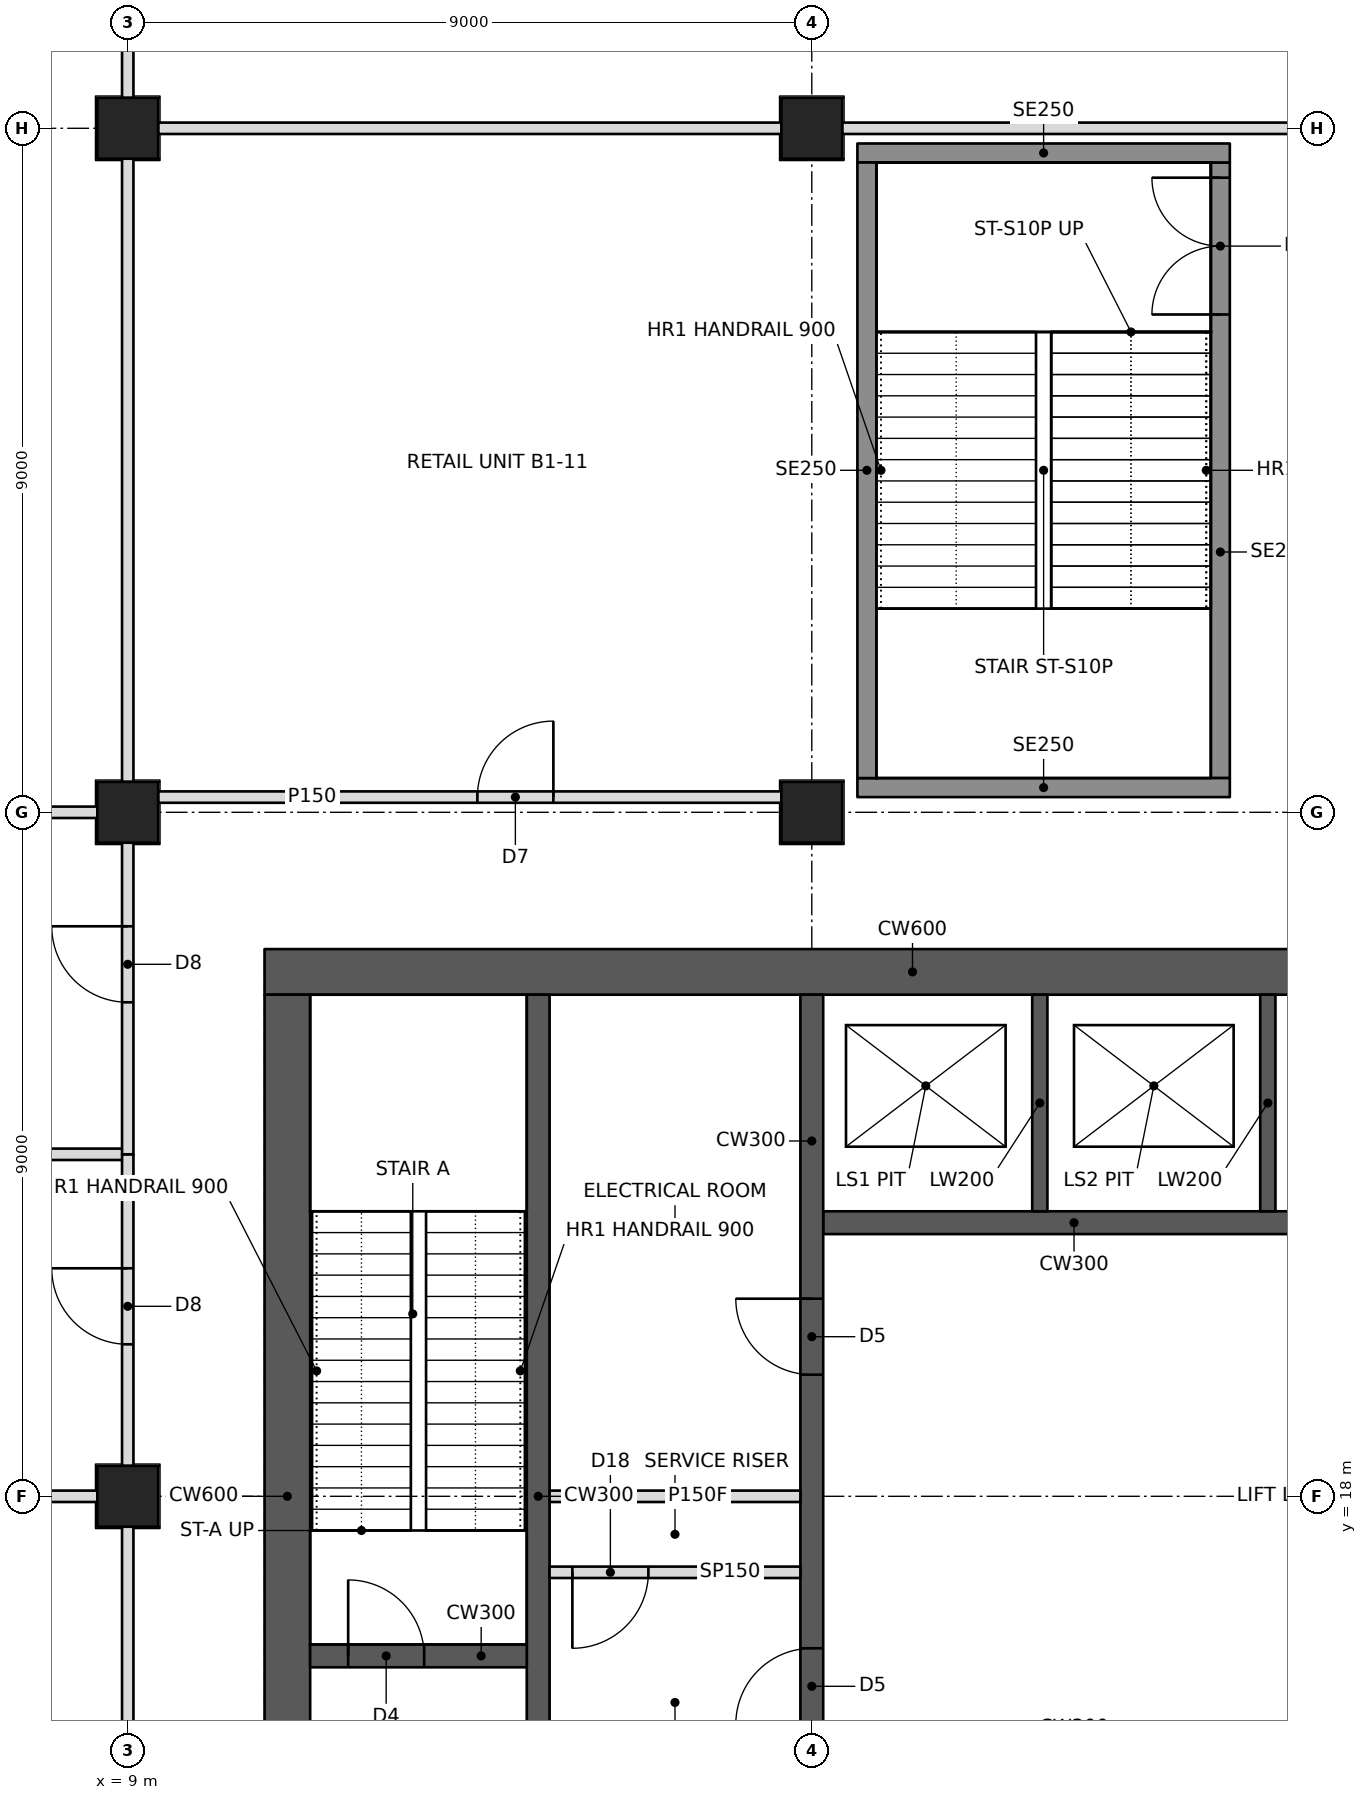
"""IFC4 building model, lengths in metres.
Left out: names, types, materials, properties, quantities, classifications, styles, units other than length and angle.
Written with IfcOpenShell. Run it as: python <this file> out.ifc"""

import sys

from ifc_helpers import new_model, si_unit, direction, frame, frame_2d, origin, origin_2d, place, context, subcontext, project, spatial, rectangle, hollow_rectangle, extrude, element, fill, save


model = new_model("IFC4")
c1 = context("Model", 3, precision=1e-05, world=origin(), true_north=direction((0.0, 1.0)))
c2 = subcontext(c1, "Body", "Model", "MODEL_VIEW")
j1 = project(units=[si_unit("LENGTHUNIT", "METRE"), si_unit("PLANEANGLEUNIT", "RADIAN")], contexts=[c1])
p1 = place(None, origin())
s1 = spatial("IfcSite", under=j1, at=p1, CompositionType="ELEMENT")
p2 = place(p1, origin())
s2 = spatial("IfcBuilding", under=s1, at=p2, CompositionType="ELEMENT")
p3 = place(p2, frame((0.0, 0.0, -5.5)))
s3 = spatial("IfcBuildingStorey", under=s2, at=p3, CompositionType="ELEMENT", Elevation=-5.5)
for number, where, z_axis, x_axis in (
    (1, (9.0, 18.0, 0.0), (0.0, 0.0, 1.0), (1.0, 0.0, 0.0)),
    (2, (9.0, 27.0, 0.0), (0.0, 0.0, 1.0), (1.0, 0.0, 0.0)),
    (3, (9.0, 36.0, 0.0), (0.0, 0.0, 1.0), (1.0, 0.0, 0.0)),
    (4, (18.0, 27.0, 0.0), (0.0, 0.0, 1.0), (1.0, 0.0, 0.0)),
    (5, (18.0, 36.0, 0.0), (0.0, 0.0, 1.0), (1.0, 0.0, 0.0)),
):
    element("IfcColumn", number, at=place(p3, frame(where, z_axis=z_axis, x_axis=x_axis)), inside=s3, PredefinedType="COLUMN", context=c2, shape_type="SweptSolid", body=[
        extrude(hollow_rectangle(XDim=0.8, YDim=0.8, WallThickness=0.1, at=origin_2d()), origin(), (0.0, 0.0, 1.0), 5.5),
    ])
p4 = place(p3, frame((10.8, 24.9, 0.0), z_axis=(0.0, 0.0, 1.0), x_axis=(1.0, 0.0, 0.0)))
e6 = element("IfcWall", 6, at=p4, inside=s3, PredefinedType="SHEAR", context=c2, shape_type="SweptSolid", body=[
    extrude(rectangle(XDim=23.4, YDim=0.6, at=frame_2d((11.7, 0.0))), origin(), (0.0, 0.0, 1.0), 5.5),
])
p5 = place(p4, frame((17.2, 0.0, 0.0)))
e7 = element("IfcOpeningElement", 7, at=p5, cuts=e6, PredefinedType="OPENING", context=c2, shape_type="SweptSolid", body=[
    extrude(rectangle(XDim=1.8, YDim=2.1, at=frame_2d((0.9, 1.05))), frame((0.0, 0.31, 0.0), z_axis=(0.0, -1.0, 0.0), x_axis=(1.0, 0.0, 0.0)), (0.0, 0.0, 1.0), 0.62),
])
p6 = place(p4, frame((21.1, 0.0, 0.0)))
e8 = element("IfcOpeningElement", 8, at=p6, cuts=e6, PredefinedType="OPENING", context=c2, shape_type="SweptSolid", body=[
    extrude(rectangle(XDim=1.0, YDim=2.1, at=frame_2d((0.5, 1.05))), frame((0.0, 0.31, 0.0), z_axis=(0.0, -1.0, 0.0), x_axis=(1.0, 0.0, 0.0)), (0.0, 0.0, 1.0), 0.62),
])
p7 = place(p3, frame((11.1, 11.4, 0.0), z_axis=(0.0, 0.0, 1.0), x_axis=(0.0, 1.0, 0.0)))
e9 = element("IfcWall", 9, at=p7, inside=s3, PredefinedType="SHEAR", context=c2, shape_type="SweptSolid", body=[
    extrude(rectangle(XDim=13.2, YDim=0.6, at=frame_2d((6.6, 0.0))), origin(), (0.0, 0.0, 1.0), 5.5),
])
p8 = place(p3, frame((14.4, 11.4, 0.0), z_axis=(0.0, 0.0, 1.0), x_axis=(0.0, 1.0, 0.0)))
e10 = element("IfcWall", 10, at=p8, inside=s3, PredefinedType="SHEAR", context=c2, shape_type="SweptSolid", body=[
    extrude(rectangle(XDim=13.2, YDim=0.3, at=frame_2d((6.6, 0.0))), origin(), (0.0, 0.0, 1.0), 5.5),
])
p9 = place(p3, frame((11.4, 15.9, 0.0), z_axis=(0.0, 0.0, 1.0), x_axis=(1.0, 0.0, 0.0)))
e11 = element("IfcWall", 11, at=p9, inside=s3, PredefinedType="SHEAR", context=c2, shape_type="SweptSolid", body=[
    extrude(rectangle(XDim=2.85, YDim=0.3, at=frame_2d((1.425, 0.0))), origin(), (0.0, 0.0, 1.0), 5.5),
])
p10 = place(p9, frame((0.5, 0.0, 0.0)))
e12 = element("IfcOpeningElement", 12, at=p10, cuts=e11, PredefinedType="OPENING", context=c2, shape_type="SweptSolid", body=[
    extrude(rectangle(XDim=1.0, YDim=2.1, at=frame_2d((0.5, 1.05))), frame((0.0, 0.16, 0.0), z_axis=(0.0, -1.0, 0.0), x_axis=(1.0, 0.0, 0.0)), (0.0, 0.0, 1.0), 0.32),
])
p11 = place(p3, frame((18.0, 11.4, 0.0), z_axis=(0.0, 0.0, 1.0), x_axis=(0.0, 1.0, 0.0)))
e13 = element("IfcWall", 13, at=p11, inside=s3, PredefinedType="SHEAR", context=c2, shape_type="SweptSolid", body=[
    extrude(rectangle(XDim=13.2, YDim=0.3, at=frame_2d((6.6, 0.0))), origin(), (0.0, 0.0, 1.0), 5.5),
])
p12 = place(p11, frame((3.6, 0.0, 0.0)))
e14 = element("IfcOpeningElement", 14, at=p12, cuts=e13, PredefinedType="OPENING", context=c2, shape_type="SweptSolid", body=[
    extrude(rectangle(XDim=1.0, YDim=2.1, at=frame_2d((0.5, 1.05))), frame((0.0, 0.16, 0.0), z_axis=(0.0, -1.0, 0.0), x_axis=(1.0, 0.0, 0.0)), (0.0, 0.0, 1.0), 0.32),
])
p13 = place(p11, frame((8.2, 0.0, 0.0)))
e15 = element("IfcOpeningElement", 15, at=p13, cuts=e13, PredefinedType="OPENING", context=c2, shape_type="SweptSolid", body=[
    extrude(rectangle(XDim=1.0, YDim=2.1, at=frame_2d((0.5, 1.05))), frame((0.0, 0.16, 0.0), z_axis=(0.0, -1.0, 0.0), x_axis=(1.0, 0.0, 0.0)), (0.0, 0.0, 1.0), 0.32),
])
p14 = place(p3, frame((14.55, 18.0, 0.0), z_axis=(0.0, 0.0, 1.0), x_axis=(1.0, 0.0, 0.0)))
e16 = element("IfcWall", 16, at=p14, inside=s3, PredefinedType="PARTITIONING", context=c2, shape_type="SweptSolid", body=[
    extrude(rectangle(XDim=3.3, YDim=0.15, at=frame_2d((1.65, 0.0))), origin(), (0.0, 0.0, 1.0), 5.2),
])
p15 = place(p3, frame((18.15, 21.6, 0.0), z_axis=(0.0, 0.0, 1.0), x_axis=(1.0, 0.0, 0.0)))
e17 = element("IfcWall", 17, at=p15, inside=s3, PredefinedType="SHEAR", context=c2, shape_type="SweptSolid", body=[
    extrude(rectangle(XDim=9.0, YDim=0.3, at=frame_2d((4.5, 0.0))), origin(), (0.0, 0.0, 1.0), 5.5),
])
p16 = place(p15, frame((6.75, 0.0, 0.0)))
e18 = element("IfcOpeningElement", 18, at=p16, cuts=e17, PredefinedType="OPENING", context=c2, shape_type="SweptSolid", body=[
    extrude(rectangle(XDim=1.2, YDim=2.1, at=frame_2d((0.6, 1.05))), frame((0.0, 0.16, 0.0), z_axis=(0.0, -1.0, 0.0), x_axis=(1.0, 0.0, 0.0)), (0.0, 0.0, 1.0), 0.32),
])
for number, where, z_axis, x_axis in (
    (19, (21.0, 21.75, 0.0), (0.0, 0.0, 1.0), (0.0, 1.0, 0.0)),
    (20, (24.0, 21.75, 0.0), (0.0, 0.0, 1.0), (0.0, 1.0, 0.0)),
):
    element("IfcWall", number, at=place(p3, frame(where, z_axis=z_axis, x_axis=x_axis)), inside=s3, PredefinedType="SHEAR", context=c2, shape_type="SweptSolid", body=[
        extrude(rectangle(XDim=2.85, YDim=0.2, at=frame_2d((1.425, 0.0))), origin(), (0.0, 0.0, 1.0), 5.5),
    ])
p17 = place(p3, frame((0.4, 18.0, 0.0), z_axis=(0.0, 0.0, 1.0), x_axis=(1.0, 0.0, 0.0)))
e21 = element("IfcWall", 21, at=p17, inside=s3, PredefinedType="PARTITIONING", context=c2, shape_type="SweptSolid", body=[
    extrude(rectangle(XDim=8.2, YDim=0.15, at=frame_2d((4.1, 0.0))), origin(), (0.0, 0.0, 1.0), 4.253),
])
p18 = place(p3, frame((-9.3, 22.5, 0.0), z_axis=(0.0, 0.0, 1.0), x_axis=(1.0, 0.0, 0.0)))
e22 = element("IfcWall", 22, at=p18, inside=s3, PredefinedType="PARTITIONING", context=c2, shape_type="SweptSolid", body=[
    extrude(rectangle(XDim=18.3, YDim=0.15, at=frame_2d((9.15, 0.0))), origin(), (0.0, 0.0, 1.0), 4.252),
])
p19 = place(p3, frame((0.4, 27.0, 0.0), z_axis=(0.0, 0.0, 1.0), x_axis=(1.0, 0.0, 0.0)))
e23 = element("IfcWall", 23, at=p19, inside=s3, PredefinedType="PARTITIONING", context=c2, shape_type="SweptSolid", body=[
    extrude(rectangle(XDim=8.2, YDim=0.15, at=frame_2d((4.1, 0.0))), origin(), (0.0, 0.0, 1.0), 4.253),
])
p20 = place(p3, frame((9.0, 17.6, 0.0), z_axis=(0.0, 0.0, 1.0), x_axis=(0.0, -1.0, 0.0)))
e24 = element("IfcWall", 24, at=p20, inside=s3, PredefinedType="PARTITIONING", context=c2, shape_type="SweptSolid", body=[
    extrude(rectangle(XDim=8.2, YDim=0.15, at=frame_2d((4.1, 0.0))), origin(), (0.0, 0.0, 1.0), 4.253),
])
p21 = place(p20, frame((6.6, 0.0, 0.0)))
e25 = element("IfcOpeningElement", 25, at=p21, cuts=e24, PredefinedType="OPENING", context=c2, shape_type="SweptSolid", body=[
    extrude(rectangle(XDim=1.0, YDim=2.1, at=frame_2d((0.5, 1.05))), frame((0.0, 0.085, 0.0), z_axis=(0.0, -1.0, 0.0), x_axis=(1.0, 0.0, 0.0)), (0.0, 0.0, 1.0), 0.17),
])
p22 = place(p3, frame((9.0, 22.5, 0.0), z_axis=(0.0, 0.0, 1.0), x_axis=(0.0, -1.0, 0.0)))
e26 = element("IfcWall", 26, at=p22, inside=s3, PredefinedType="PARTITIONING", context=c2, shape_type="SweptSolid", body=[
    extrude(rectangle(XDim=4.1, YDim=0.15, at=frame_2d((2.05, 0.0))), origin(), (0.0, 0.0, 1.0), 4.253),
])
p23 = place(p22, frame((1.5, 0.0, 0.0)))
e27 = element("IfcOpeningElement", 27, at=p23, cuts=e26, PredefinedType="OPENING", context=c2, shape_type="SweptSolid", body=[
    extrude(rectangle(XDim=1.0, YDim=2.1, at=frame_2d((0.5, 1.05))), frame((0.0, 0.085, 0.0), z_axis=(0.0, -1.0, 0.0), x_axis=(1.0, 0.0, 0.0)), (0.0, 0.0, 1.0), 0.17),
])
p24 = place(p3, frame((9.0, 26.6, 0.0), z_axis=(0.0, 0.0, 1.0), x_axis=(0.0, -1.0, 0.0)))
e28 = element("IfcWall", 28, at=p24, inside=s3, PredefinedType="PARTITIONING", context=c2, shape_type="SweptSolid", body=[
    extrude(rectangle(XDim=4.1, YDim=0.15, at=frame_2d((2.05, 0.0))), origin(), (0.0, 0.0, 1.0), 4.253),
])
p25 = place(p24, frame((1.1, 0.0, 0.0)))
e29 = element("IfcOpeningElement", 29, at=p25, cuts=e28, PredefinedType="OPENING", context=c2, shape_type="SweptSolid", body=[
    extrude(rectangle(XDim=1.0, YDim=2.1, at=frame_2d((0.5, 1.05))), frame((0.0, 0.085, 0.0), z_axis=(0.0, -1.0, 0.0), x_axis=(1.0, 0.0, 0.0)), (0.0, 0.0, 1.0), 0.17),
])
p26 = place(p3, frame((17.6, 27.2, 0.0), z_axis=(0.0, 0.0, 1.0), x_axis=(-1.0, 0.0, 0.0)))
e30 = element("IfcWall", 30, at=p26, inside=s3, PredefinedType="PARTITIONING", context=c2, shape_type="SweptSolid", body=[
    extrude(rectangle(XDim=8.2, YDim=0.15, at=frame_2d((4.1, 0.0))), origin(), (0.0, 0.0, 1.0), 4.253),
])
p27 = place(p26, frame((3.0, 0.0, 0.0)))
e31 = element("IfcOpeningElement", 31, at=p27, cuts=e30, PredefinedType="OPENING", context=c2, shape_type="SweptSolid", body=[
    extrude(rectangle(XDim=1.0, YDim=2.1, at=frame_2d((0.5, 1.05))), frame((0.0, 0.085, 0.0), z_axis=(0.0, -1.0, 0.0), x_axis=(1.0, 0.0, 0.0)), (0.0, 0.0, 1.0), 0.17),
])
p28 = place(p3, frame((9.0, 27.4, 0.0), z_axis=(0.0, 0.0, 1.0), x_axis=(0.0, 1.0, 0.0)))
e32 = element("IfcWall", 32, at=p28, inside=s3, PredefinedType="PARTITIONING", context=c2, shape_type="SweptSolid", body=[
    extrude(rectangle(XDim=8.2, YDim=0.15, at=frame_2d((4.1, 0.0))), origin(), (0.0, 0.0, 1.0), 4.253),
])
p29 = place(p3, frame((26.6, 36.0, 0.0), z_axis=(0.0, 0.0, 1.0), x_axis=(-1.0, 0.0, 0.0)))
e33 = element("IfcWall", 33, at=p29, inside=s3, PredefinedType="PARTITIONING", context=c2, shape_type="SweptSolid", body=[
    extrude(rectangle(XDim=8.2, YDim=0.15, at=frame_2d((4.1, 0.0))), origin(), (0.0, 0.0, 1.0), 4.253),
])
p30 = place(p29, frame((1.1, 0.0, 0.0)))
e34 = element("IfcOpeningElement", 34, at=p30, cuts=e33, PredefinedType="OPENING", context=c2, shape_type="SweptSolid", body=[
    extrude(rectangle(XDim=1.0, YDim=2.1, at=frame_2d((0.5, 1.05))), frame((0.0, 0.085, 0.0), z_axis=(0.0, -1.0, 0.0), x_axis=(1.0, 0.0, 0.0)), (0.0, 0.0, 1.0), 0.17),
])
p31 = place(p3, frame((17.6, 36.0, 0.0), z_axis=(0.0, 0.0, 1.0), x_axis=(-1.0, 0.0, 0.0)))
e35 = element("IfcWall", 35, at=p31, inside=s3, PredefinedType="PARTITIONING", context=c2, shape_type="SweptSolid", body=[
    extrude(rectangle(XDim=8.2, YDim=0.15, at=frame_2d((4.1, 0.0))), origin(), (0.0, 0.0, 1.0), 4.253),
])
p32 = place(p3, frame((9.0, 36.4, 0.0), z_axis=(0.0, 0.0, 1.0), x_axis=(0.0, 1.0, 0.0)))
e36 = element("IfcWall", 36, at=p32, inside=s3, PredefinedType="PARTITIONING", context=c2, shape_type="SweptSolid", body=[
    extrude(rectangle(XDim=8.401, YDim=0.15, at=frame_2d((4.2, 0.0))), origin(), (0.0, 0.0, 1.0), 4.253),
])
p33 = place(p3, frame((14.55, 17.0, 0.0), z_axis=(0.0, 0.0, 1.0), x_axis=(1.0, 0.0, 0.0)))
e37 = element("IfcWall", 37, at=p33, inside=s3, PredefinedType="PARTITIONING", context=c2, shape_type="SweptSolid", body=[
    extrude(rectangle(XDim=3.3, YDim=0.15, at=frame_2d((1.65, 0.0))), origin(), (0.0, 0.0, 1.0), 5.2),
])
p34 = place(p33, frame((0.3, 0.0, 0.0)))
e38 = element("IfcOpeningElement", 38, at=p34, cuts=e37, PredefinedType="OPENING", context=c2, shape_type="SweptSolid", body=[
    extrude(rectangle(XDim=1.0, YDim=2.1, at=frame_2d((0.5, 1.05))), frame((0.0, 0.085, 0.0), z_axis=(0.0, -1.0, 0.0), x_axis=(1.0, 0.0, 0.0)), (0.0, 0.0, 1.0), 0.17),
])
for number, where, z_axis, x_axis in (
    (39, (18.6, 27.325, 0.0), (0.0, 0.0, 1.0), (1.0, 0.0, 0.0)),
    (40, (18.6, 35.675, 0.0), (0.0, 0.0, 1.0), (1.0, 0.0, 0.0)),
):
    element("IfcWall", number, at=place(p3, frame(where, z_axis=z_axis, x_axis=x_axis)), inside=s3, PredefinedType="SOLIDWALL", context=c2, shape_type="SweptSolid", body=[
        extrude(rectangle(XDim=4.9, YDim=0.25, at=frame_2d((2.45, 0.0))), origin(), (0.0, 0.0, 1.0), 5.2),
    ])
p35 = place(p3, frame((18.725, 27.45, 0.0), z_axis=(0.0, 0.0, 1.0), x_axis=(0.0, 1.0, 0.0)))
e41 = element("IfcWall", 41, at=p35, inside=s3, PredefinedType="SOLIDWALL", context=c2, shape_type="SweptSolid", body=[
    extrude(rectangle(XDim=8.1, YDim=0.25, at=frame_2d((4.05, 0.0))), origin(), (0.0, 0.0, 1.0), 5.2),
])
p36 = place(p3, frame((23.375, 27.45, 0.0), z_axis=(0.0, 0.0, 1.0), x_axis=(0.0, 1.0, 0.0)))
e42 = element("IfcWall", 42, at=p36, inside=s3, PredefinedType="SOLIDWALL", context=c2, shape_type="SweptSolid", body=[
    extrude(rectangle(XDim=8.1, YDim=0.25, at=frame_2d((4.05, 0.0))), origin(), (0.0, 0.0, 1.0), 5.2),
])
p37 = place(p36, frame((6.1, 0.0, 0.0)))
e43 = element("IfcOpeningElement", 43, at=p37, cuts=e42, PredefinedType="OPENING", context=c2, shape_type="SweptSolid", body=[
    extrude(rectangle(XDim=1.8, YDim=2.1, at=frame_2d((0.9, 1.05))), frame((0.0, 0.135, 0.0), z_axis=(0.0, -1.0, 0.0), x_axis=(1.0, 0.0, 0.0)), (0.0, 0.0, 1.0), 0.27),
])
p38 = place(p27, frame((1.0, 0.0, 0.0), z_axis=(0.0, 0.0, 1.0), x_axis=(-1.0, 0.0, 0.0)))
e44 = element("IfcDoor", 44, at=p38, inside=s3, OperationType="SINGLE_SWING_RIGHT", PredefinedType="DOOR", context=c2, shape_type="SweptSolid", body=[
    extrude(rectangle(XDim=1.0, YDim=2.1, at=frame_2d((0.5, 1.05))), frame((0.0, 0.025, 0.0), z_axis=(0.0, -1.0, 0.0), x_axis=(1.0, 0.0, 0.0)), (0.0, 0.0, 1.0), 0.05),
])
fill(e31, e44)
p39 = place(p23, frame((1.0, 0.0, 0.0), z_axis=(0.0, 0.0, 1.0), x_axis=(-1.0, 0.0, 0.0)))
e45 = element("IfcDoor", 45, at=p39, inside=s3, OperationType="SINGLE_SWING_RIGHT", PredefinedType="DOOR", context=c2, shape_type="SweptSolid", body=[
    extrude(rectangle(XDim=1.0, YDim=2.1, at=frame_2d((0.5, 1.05))), frame((0.0, 0.025, 0.0), z_axis=(0.0, -1.0, 0.0), x_axis=(1.0, 0.0, 0.0)), (0.0, 0.0, 1.0), 0.05),
])
fill(e27, e45)
p40 = place(p25, frame((1.0, 0.0, 0.0), z_axis=(0.0, 0.0, 1.0), x_axis=(-1.0, 0.0, 0.0)))
e46 = element("IfcDoor", 46, at=p40, inside=s3, OperationType="SINGLE_SWING_RIGHT", PredefinedType="DOOR", context=c2, shape_type="SweptSolid", body=[
    extrude(rectangle(XDim=1.0, YDim=2.1, at=frame_2d((0.5, 1.05))), frame((0.0, 0.025, 0.0), z_axis=(0.0, -1.0, 0.0), x_axis=(1.0, 0.0, 0.0)), (0.0, 0.0, 1.0), 0.05),
])
fill(e29, e46)
p41 = place(p34, frame((1.0, 0.0, 0.0), z_axis=(0.0, 0.0, 1.0), x_axis=(-1.0, 0.0, 0.0)))
e47 = element("IfcDoor", 47, at=p41, inside=s3, OperationType="SINGLE_SWING_RIGHT", PredefinedType="DOOR", context=c2, shape_type="SweptSolid", body=[
    extrude(rectangle(XDim=1.0, YDim=2.1, at=frame_2d((0.5, 1.05))), frame((0.0, 0.025, 0.0), z_axis=(0.0, -1.0, 0.0), x_axis=(1.0, 0.0, 0.0)), (0.0, 0.0, 1.0), 0.05),
])
fill(e38, e47)
p42 = place(p10, origin())
e48 = element("IfcDoor", 48, at=p42, inside=s3, OperationType="SINGLE_SWING_LEFT", PredefinedType="DOOR", context=c2, shape_type="SweptSolid", body=[
    extrude(rectangle(XDim=1.0, YDim=2.1, at=frame_2d((0.5, 1.05))), frame((0.0, 0.025, 0.0), z_axis=(0.0, -1.0, 0.0), x_axis=(1.0, 0.0, 0.0)), (0.0, 0.0, 1.0), 0.05),
])
fill(e12, e48)
p43 = place(p12, origin())
e49 = element("IfcDoor", 49, at=p43, inside=s3, OperationType="SINGLE_SWING_LEFT", PredefinedType="DOOR", context=c2, shape_type="SweptSolid", body=[
    extrude(rectangle(XDim=1.0, YDim=2.1, at=frame_2d((0.5, 1.05))), frame((0.0, 0.025, 0.0), z_axis=(0.0, -1.0, 0.0), x_axis=(1.0, 0.0, 0.0)), (0.0, 0.0, 1.0), 0.05),
])
fill(e14, e49)
p44 = place(p13, origin())
e50 = element("IfcDoor", 50, at=p44, inside=s3, OperationType="SINGLE_SWING_RIGHT", PredefinedType="DOOR", context=c2, shape_type="SweptSolid", body=[
    extrude(rectangle(XDim=1.0, YDim=2.1, at=frame_2d((0.5, 1.05))), frame((0.0, 0.025, 0.0), z_axis=(0.0, -1.0, 0.0), x_axis=(1.0, 0.0, 0.0)), (0.0, 0.0, 1.0), 0.05),
])
fill(e15, e50)
p45 = place(p37, origin())
e51 = element("IfcDoor", 51, at=p45, inside=s3, OperationType="DOUBLE_DOOR_SINGLE_SWING", PredefinedType="DOOR", context=c2, shape_type="SweptSolid", body=[
    extrude(rectangle(XDim=1.8, YDim=2.1, at=frame_2d((0.9, 1.05))), frame((0.0, 0.025, 0.0), z_axis=(0.0, -1.0, 0.0), x_axis=(1.0, 0.0, 0.0)), (0.0, 0.0, 1.0), 0.05),
])
fill(e43, e51)
save(model, sys.argv[1])
